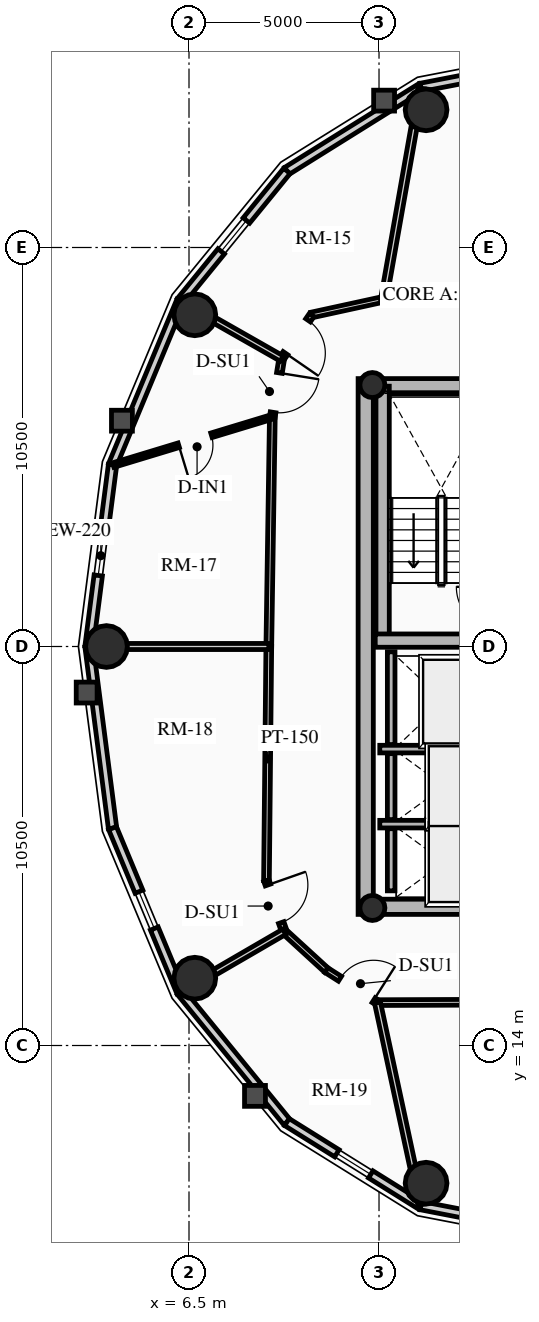
"""IFC4 building model, lengths in metres.
Left out: names, types, materials, properties, quantities, classifications, styles, units other than length and angle.
Written with IfcOpenShell. Run it as: python <this file> out.ifc"""

import sys

from ifc_helpers import new_model, si_unit, direction, frame, frame_2d, origin, origin_2d, place, context, subcontext, project, spatial, rectangle, circle, hollow_circle, extrude, source, transform, mapped, element, fill, save


model = new_model("IFC4")
c1 = context("Model", 3, precision=1e-05, world=origin(), true_north=direction((0.0, 1.0)))
c2 = subcontext(c1, "Body", "Model", "MODEL_VIEW")
j1 = project(units=[si_unit("LENGTHUNIT", "METRE"), si_unit("PLANEANGLEUNIT", "RADIAN")], contexts=[c1])
p1 = place(None, origin())
s1 = spatial("IfcSite", under=j1, at=p1, CompositionType="ELEMENT")
p2 = place(p1, origin())
s2 = spatial("IfcBuilding", under=s1, at=p2, CompositionType="ELEMENT")
p3 = place(p2, frame((0.0, 0.0, 211.21)))
s3 = spatial("IfcBuildingStorey", under=s2, at=p3, CompositionType="ELEMENT", Elevation=211.21)
p4 = place(p3, frame((11.15, 17.45, 0.0), z_axis=(0.0, 0.0, 1.0), x_axis=(0.0, 1.0, 0.0)))
e1 = element("IfcWall", 1, at=p4, inside=s3, PredefinedType="SHEAR", context=c2, shape_type="SweptSolid", body=[
    extrude(rectangle(XDim=14.1, YDim=0.4, at=frame_2d((7.05, 0.0))), origin(), (0.0, 0.0, 1.0), 2.91),
])
p5 = place(p3, frame((11.15, 17.65, 0.0), z_axis=(0.0, 0.0, 1.0), x_axis=(1.0, 0.0, 0.0)))
e2 = element("IfcWall", 2, at=p5, inside=s3, PredefinedType="SHEAR", context=c2, shape_type="SweptSolid", body=[
    extrude(rectangle(XDim=10.7, YDim=0.4, at=frame_2d((5.35, 0.0))), origin(), (0.0, 0.0, 1.0), 2.91),
])
m1 = source(origin(), c2, "Body", "SweptSolid", [
    extrude(rectangle(XDim=1.5, YDim=2.02, at=frame_2d((0.75, 1.01))), frame((0.0, 0.21, 0.0), z_axis=(0.0, -1.0, 0.0), x_axis=(1.0, 0.0, 0.0)), (0.0, 0.0, 1.0), 0.42),
])
p6 = place(p5, frame((5.45, 0.0, 0.0)))
e3 = element("IfcOpeningElement", 3, at=p6, cuts=e2, PredefinedType="OPENING", context=c2, shape_type="MappedRepresentation", body=[
    mapped(m1, transform((0.0, 0.0, 0.0), x_axis=(1.0, 0.0, 0.0), y_axis=(0.0, 1.0, 0.0), z_axis=(0.0, 0.0, 1.0), scale=1.0)),
])
p7 = place(p3, frame((11.15, 31.35, 0.0), z_axis=(0.0, 0.0, 1.0), x_axis=(1.0, 0.0, 0.0)))
e4 = element("IfcWall", 4, at=p7, inside=s3, PredefinedType="SHEAR", context=c2, shape_type="SweptSolid", body=[
    extrude(rectangle(XDim=10.7, YDim=0.4, at=frame_2d((5.35, 0.0))), origin(), (0.0, 0.0, 1.0), 2.91),
])
p8 = place(p7, frame((4.6, 0.0, 0.0)))
e5 = element("IfcOpeningElement", 5, at=p8, cuts=e4, PredefinedType="OPENING", context=c2, shape_type="MappedRepresentation", body=[
    mapped(m1, transform((0.0, 0.0, 0.0), x_axis=(1.0, 0.0, 0.0), y_axis=(0.0, 1.0, 0.0), z_axis=(0.0, 0.0, 1.0), scale=1.0)),
])
p9 = place(p3, frame((11.595, 24.655, 0.0), z_axis=(0.0, 0.0, 1.0), x_axis=(0.0, 1.0, 0.0)))
e6 = element("IfcWall", 6, at=p9, inside=s3, PredefinedType="SHEAR", context=c2, shape_type="SweptSolid", body=[
    extrude(rectangle(XDim=6.695, YDim=0.35, at=frame_2d((3.348, 0.0))), origin(), (0.0, 0.0, 1.0), 2.91),
])
p10 = place(p3, frame((11.4, 24.655, 0.0), z_axis=(0.0, 0.0, 1.0), x_axis=(1.0, 0.0, 0.0)))
e7 = element("IfcWall", 7, at=p10, inside=s3, PredefinedType="SHEAR", context=c2, shape_type="SweptSolid", body=[
    extrude(rectangle(XDim=3.285, YDim=0.35, at=frame_2d((1.643, 0.0))), origin(), (0.0, 0.0, 1.0), 2.91),
])
for number, where, z_axis, x_axis in (
    (8, (11.325, 17.62, 0.0), (0.0, 0.0, 1.0), (1.0, 0.0, 0.0)),
    (9, (11.325, 31.38, 0.0), (0.0, 0.0, 1.0), (1.0, 0.0, 0.0)),
):
    element("IfcColumn", number, at=place(p3, frame(where, z_axis=z_axis, x_axis=x_axis)), inside=s3, PredefinedType="COLUMN", context=c2, shape_type="SweptSolid", body=[
        extrude(hollow_circle(Radius=0.33, WallThickness=0.025, at=origin_2d()), origin(), (0.0, 0.0, 1.0), 2.91),
    ])
for number, where, z_axis, x_axis in (
    (10, (12.739, 38.623, 0.0), (0.0, 0.0, 1.0), (1.0, 0.0, 0.0)),
    (11, (6.653, 33.229, 0.0), (0.0, 0.0, 1.0), (1.0, 0.0, 0.0)),
    (12, (4.328, 24.5, 0.0), (0.0, 0.0, 1.0), (1.0, 0.0, 0.0)),
    (13, (6.653, 15.771, 0.0), (0.0, 0.0, 1.0), (1.0, 0.0, 0.0)),
    (14, (12.739, 10.377, 0.0), (0.0, 0.0, 1.0), (1.0, 0.0, 0.0)),
):
    element("IfcColumn", number, at=place(p3, frame(where, z_axis=z_axis, x_axis=x_axis)), inside=s3, PredefinedType="USERDEFINED", context=c2, shape_type="SweptSolid", body=[
        extrude(circle(Radius=0.55, at=origin_2d()), origin(), (0.0, 0.0, 1.0), 2.91),
    ])
p11 = place(p3, frame((12.597, 39.213, 0.0), z_axis=(0.0, 0.0, 1.0), x_axis=(0.981700307484, 0.190432419211, 0.0)))
e15 = element("IfcWall", 15, at=p11, inside=s3, PredefinedType="SOLIDWALL", context=c2, shape_type="SweptSolid", body=[
    extrude(rectangle(XDim=3.976, YDim=0.22, at=frame_2d((1.988, 0.0))), origin(), (0.0, 0.0, 1.0), 2.322),
])
m2 = source(origin(), c2, "Body", "SweptSolid", [
    extrude(rectangle(XDim=1.05, YDim=1.3, at=frame_2d((0.525, 0.65))), frame((0.0, 0.12, 0.0), z_axis=(0.0, -1.0, 0.0), x_axis=(1.0, 0.0, 0.0)), (0.0, 0.0, 1.0), 0.24),
])
p12 = place(p11, frame((1.463, 0.0, 0.65)))
e16 = element("IfcOpeningElement", 16, at=p12, cuts=e15, PredefinedType="OPENING", context=c2, shape_type="MappedRepresentation", body=[
    mapped(m2, transform((0.0, 0.0, 0.0), x_axis=(1.0, 0.0, 0.0), y_axis=(0.0, 1.0, 0.0), z_axis=(0.0, 0.0, 1.0), scale=1.0)),
])
p13 = place(p3, frame((9.076, 37.015, 0.0), z_axis=(0.0, 0.0, 1.0), x_axis=(0.848318713376, 0.529485939886, 0.0)))
e17 = element("IfcWall", 17, at=p13, inside=s3, PredefinedType="SOLIDWALL", context=c2, shape_type="SweptSolid", body=[
    extrude(rectangle(XDim=4.15, YDim=0.22, at=frame_2d((2.075, 0.0))), origin(), (0.0, 0.0, 1.0), 2.322),
])
p14 = place(p3, frame((6.282, 33.593, 0.0), z_axis=(0.0, 0.0, 1.0), x_axis=(0.632467166636, 0.774587169483, 0.0)))
e18 = element("IfcWall", 18, at=p14, inside=s3, PredefinedType="SOLIDWALL", context=c2, shape_type="SweptSolid", body=[
    extrude(rectangle(XDim=4.418, YDim=0.22, at=frame_2d((2.209, 0.0))), origin(), (0.0, 0.0, 1.0), 2.322),
])
p15 = place(p14, frame((1.684, 0.0, 0.65)))
e19 = element("IfcOpeningElement", 19, at=p15, cuts=e18, PredefinedType="OPENING", context=c2, shape_type="MappedRepresentation", body=[
    mapped(m2, transform((0.0, 0.0, 0.0), x_axis=(1.0, 0.0, 0.0), y_axis=(0.0, 1.0, 0.0), z_axis=(0.0, 0.0, 1.0), scale=1.0)),
])
p16 = place(p3, frame((4.488, 29.281, 0.0), z_axis=(0.0, 0.0, 1.0), x_axis=(0.384036305194, 0.923317993052, 0.0)))
e20 = element("IfcWall", 20, at=p16, inside=s3, PredefinedType="SOLIDWALL", context=c2, shape_type="SweptSolid", body=[
    extrude(rectangle(XDim=4.671, YDim=0.22, at=frame_2d((2.335, 0.0))), origin(), (0.0, 0.0, 1.0), 2.322),
])
p17 = place(p3, frame((3.87, 24.5, 0.0), z_axis=(0.0, 0.0, 1.0), x_axis=(0.128241318541, 0.991742993027, 0.0)))
e21 = element("IfcWall", 21, at=p17, inside=s3, PredefinedType="SOLIDWALL", context=c2, shape_type="SweptSolid", body=[
    extrude(rectangle(XDim=4.82, YDim=0.22, at=frame_2d((2.41, 0.0))), origin(), (0.0, 0.0, 1.0), 2.322),
])
p18 = place(p17, frame((1.885, 0.0, 0.65)))
e22 = element("IfcOpeningElement", 22, at=p18, cuts=e21, PredefinedType="OPENING", context=c2, shape_type="MappedRepresentation", body=[
    mapped(m2, transform((0.0, 0.0, 0.0), x_axis=(1.0, 0.0, 0.0), y_axis=(0.0, 1.0, 0.0), z_axis=(0.0, 0.0, 1.0), scale=1.0)),
])
p19 = place(p3, frame((4.488, 19.719, 0.0), z_axis=(0.0, 0.0, 1.0), x_axis=(-0.128241318541, 0.991742993027, 0.0)))
e23 = element("IfcWall", 23, at=p19, inside=s3, PredefinedType="SOLIDWALL", context=c2, shape_type="SweptSolid", body=[
    extrude(rectangle(XDim=4.82, YDim=0.22, at=frame_2d((2.41, 0.0))), origin(), (0.0, 0.0, 1.0), 2.322),
])
p20 = place(p3, frame((6.282, 15.407, 0.0), z_axis=(0.0, 0.0, 1.0), x_axis=(-0.384036305194, 0.923317993052, 0.0)))
e24 = element("IfcWall", 24, at=p20, inside=s3, PredefinedType="SOLIDWALL", context=c2, shape_type="SweptSolid", body=[
    extrude(rectangle(XDim=4.671, YDim=0.22, at=frame_2d((2.335, 0.0))), origin(), (0.0, 0.0, 1.0), 2.322),
])
p21 = place(p20, frame((1.81, 0.0, 0.65)))
e25 = element("IfcOpeningElement", 25, at=p21, cuts=e24, PredefinedType="OPENING", context=c2, shape_type="MappedRepresentation", body=[
    mapped(m2, transform((0.0, 0.0, 0.0), x_axis=(1.0, 0.0, 0.0), y_axis=(0.0, 1.0, 0.0), z_axis=(0.0, 0.0, 1.0), scale=1.0)),
])
p22 = place(p3, frame((9.076, 11.985, 0.0), z_axis=(0.0, 0.0, 1.0), x_axis=(-0.632467166636, 0.774587169483, 0.0)))
e26 = element("IfcWall", 26, at=p22, inside=s3, PredefinedType="SOLIDWALL", context=c2, shape_type="SweptSolid", body=[
    extrude(rectangle(XDim=4.418, YDim=0.22, at=frame_2d((2.209, 0.0))), origin(), (0.0, 0.0, 1.0), 2.322),
])
p23 = place(p3, frame((12.597, 9.787, 0.0), z_axis=(0.0, 0.0, 1.0), x_axis=(-0.848318713376, 0.529485939886, 0.0)))
e27 = element("IfcWall", 27, at=p23, inside=s3, PredefinedType="SOLIDWALL", context=c2, shape_type="SweptSolid", body=[
    extrude(rectangle(XDim=4.15, YDim=0.22, at=frame_2d((2.075, 0.0))), origin(), (0.0, 0.0, 1.0), 2.322),
])
p24 = place(p23, frame((1.55, 0.0, 0.65)))
e28 = element("IfcOpeningElement", 28, at=p24, cuts=e27, PredefinedType="OPENING", context=c2, shape_type="MappedRepresentation", body=[
    mapped(m2, transform((0.0, 0.0, 0.0), x_axis=(1.0, 0.0, 0.0), y_axis=(0.0, 1.0, 0.0), z_axis=(0.0, 0.0, 1.0), scale=1.0)),
])
p25 = place(p3, frame((16.5, 9.03, 0.0), z_axis=(0.0, 0.0, 1.0), x_axis=(-0.981700307484, 0.190432419211, 0.0)))
e29 = element("IfcWall", 29, at=p25, inside=s3, PredefinedType="SOLIDWALL", context=c2, shape_type="SweptSolid", body=[
    extrude(rectangle(XDim=3.976, YDim=0.22, at=frame_2d((1.988, 0.0))), origin(), (0.0, 0.0, 1.0), 2.322),
])
p26 = place(p25, frame((1.463, 0.0, 0.65)))
e30 = element("IfcOpeningElement", 30, at=p26, cuts=e29, PredefinedType="OPENING", context=c2, shape_type="MappedRepresentation", body=[
    mapped(m2, transform((0.0, 0.0, 0.0), x_axis=(1.0, 0.0, 0.0), y_axis=(0.0, 1.0, 0.0), z_axis=(0.0, 0.0, 1.0), scale=1.0)),
])
p27 = place(p3, frame((11.52, 21.8, 0.0), z_axis=(0.0, 0.0, 1.0), x_axis=(1.0, 0.0, 0.0)))
e31 = element("IfcWall", 31, at=p27, inside=s3, PredefinedType="SHEAR", context=c2, shape_type="SweptSolid", body=[
    extrude(rectangle(XDim=2.97, YDim=0.2, at=frame_2d((1.485, 0.0))), origin(), (0.0, 0.0, 1.0), 2.91),
])
p28 = place(p3, frame((11.82, 21.92, 0.0), z_axis=(0.0, 0.0, 1.0), x_axis=(0.0, 1.0, 0.0)))
e32 = element("IfcWall", 32, at=p28, inside=s3, PredefinedType="SHEAR", context=c2, shape_type="SweptSolid", body=[
    extrude(rectangle(XDim=2.44, YDim=0.2, at=frame_2d((1.22, 0.0))), origin(), (0.0, 0.0, 1.0), 2.91),
])
p29 = place(p3, frame((11.52, 19.825, 0.0), z_axis=(0.0, 0.0, 1.0), x_axis=(1.0, 0.0, 0.0)))
e33 = element("IfcWall", 33, at=p29, inside=s3, PredefinedType="SHEAR", context=c2, shape_type="SweptSolid", body=[
    extrude(rectangle(XDim=2.97, YDim=0.2, at=frame_2d((1.485, 0.0))), origin(), (0.0, 0.0, 1.0), 2.91),
])
p30 = place(p3, frame((11.82, 19.945, 0.0), z_axis=(0.0, 0.0, 1.0), x_axis=(0.0, 1.0, 0.0)))
e34 = element("IfcWall", 34, at=p30, inside=s3, PredefinedType="SHEAR", context=c2, shape_type="SweptSolid", body=[
    extrude(rectangle(XDim=1.735, YDim=0.2, at=frame_2d((0.867, 0.0))), origin(), (0.0, 0.0, 1.0), 2.91),
])
p31 = place(p3, frame((11.82, 18.07, 0.0), z_axis=(0.0, 0.0, 1.0), x_axis=(0.0, 1.0, 0.0)))
e35 = element("IfcWall", 35, at=p31, inside=s3, PredefinedType="SHEAR", context=c2, shape_type="SweptSolid", body=[
    extrude(rectangle(XDim=1.635, YDim=0.2, at=frame_2d((0.817, 0.0))), origin(), (0.0, 0.0, 1.0), 2.91),
])
p32 = place(p3, frame((18.143, 33.86, 0.0), z_axis=(0.0, 0.0, 1.0), x_axis=(-0.999419208319, -0.034077060363, 0.0)))
e36 = element("IfcWall", 36, at=p32, inside=s3, PredefinedType="PARTITIONING", context=c2, shape_type="SweptSolid", body=[
    extrude(rectangle(XDim=6.527, YDim=0.15, at=frame_2d((3.263, 0.0))), origin(), (0.0, 0.0, 1.0), 2.255),
])
p33 = place(p3, frame((11.62, 33.637, 0.0), z_axis=(0.0, 0.0, 1.0), x_axis=(-0.97702579435, -0.213121085711, 0.0)))
e37 = element("IfcWall", 37, at=p33, inside=s3, PredefinedType="PARTITIONING", context=c2, shape_type="SweptSolid", body=[
    extrude(rectangle(XDim=1.935, YDim=0.15, at=frame_2d((0.967, 0.0))), origin(), (0.0, 0.0, 1.0), 2.255),
])
p34 = place(p3, frame((9.729, 33.225, 0.0), z_axis=(0.0, 0.0, 1.0), x_axis=(-0.567183649484, -0.82359134755, 0.0)))
e38 = element("IfcWall", 38, at=p34, inside=s3, PredefinedType="PARTITIONING", context=c2, shape_type="SweptSolid", body=[
    extrude(rectangle(XDim=1.392, YDim=0.15, at=frame_2d((0.696, 0.0))), origin(), (0.0, 0.0, 1.0), 2.322),
])
m3 = source(origin(), c2, "Body", "SweptSolid", [
    extrude(rectangle(XDim=1.05, YDim=2.015, at=frame_2d((0.525, 1.007))), frame((0.0, 0.085, 0.0), z_axis=(0.0, -1.0, 0.0), x_axis=(1.0, 0.0, 0.0)), (0.0, 0.0, 1.0), 0.17),
])
p35 = place(p34, frame((0.171, 0.0, 0.0)))
e39 = element("IfcOpeningElement", 39, at=p35, cuts=e38, PredefinedType="OPENING", context=c2, shape_type="MappedRepresentation", body=[
    mapped(m3, transform((0.0, 0.0, 0.0), x_axis=(1.0, 0.0, 0.0), y_axis=(0.0, 1.0, 0.0), z_axis=(0.0, 0.0, 1.0), scale=1.0)),
])
p36 = place(p3, frame((8.94, 32.078, 0.0), z_axis=(0.0, 0.0, 1.0), x_axis=(-0.159148467753, -0.98725466077, 0.0)))
e40 = element("IfcWall", 40, at=p36, inside=s3, PredefinedType="PARTITIONING", context=c2, shape_type="SweptSolid", body=[
    extrude(rectangle(XDim=1.554, YDim=0.15, at=frame_2d((0.777, 0.0))), origin(), (0.0, 0.0, 1.0), 2.255),
])
p37 = place(p36, frame((0.384, 0.0, 0.0)))
e41 = element("IfcOpeningElement", 41, at=p37, cuts=e40, PredefinedType="OPENING", context=c2, shape_type="MappedRepresentation", body=[
    mapped(m3, transform((0.0, 0.0, 0.0), x_axis=(1.0, 0.0, 0.0), y_axis=(0.0, 1.0, 0.0), z_axis=(0.0, 0.0, 1.0), scale=1.0)),
])
p38 = place(p3, frame((8.693, 30.544, 0.0), z_axis=(0.0, 0.0, 1.0), x_axis=(-0.015307007986, -0.99988284089, 0.0)))
e42 = element("IfcWall", 42, at=p38, inside=s3, PredefinedType="PARTITIONING", context=c2, shape_type="SweptSolid", body=[
    extrude(rectangle(XDim=6.045, YDim=0.15, at=frame_2d((3.022, 0.0))), origin(), (0.0, 0.0, 1.0), 2.255),
])
p39 = place(p3, frame((8.6, 24.5, 0.0), z_axis=(0.0, 0.0, 1.0), x_axis=(-0.010023665349, -0.999949761805, 0.0)))
e43 = element("IfcWall", 43, at=p39, inside=s3, PredefinedType="PARTITIONING", context=c2, shape_type="SweptSolid", body=[
    extrude(rectangle(XDim=6.162, YDim=0.15, at=frame_2d((3.081, 0.0))), origin(), (0.0, 0.0, 1.0), 2.255),
])
p40 = place(p3, frame((8.538, 18.338, 0.0), z_axis=(0.0, 0.0, 1.0), x_axis=(0.331358150167, -0.94350504838, 0.0)))
e44 = element("IfcWall", 44, at=p40, inside=s3, PredefinedType="PARTITIONING", context=c2, shape_type="SweptSolid", body=[
    extrude(rectangle(XDim=1.424, YDim=0.15, at=frame_2d((0.712, 0.0))), origin(), (0.0, 0.0, 1.0), 2.255),
])
p41 = place(p40, frame((0.12, 0.0, 0.0)))
e45 = element("IfcOpeningElement", 45, at=p41, cuts=e44, PredefinedType="OPENING", context=c2, shape_type="MappedRepresentation", body=[
    mapped(m3, transform((0.0, 0.0, 0.0), x_axis=(1.0, 0.0, 0.0), y_axis=(0.0, 1.0, 0.0), z_axis=(0.0, 0.0, 1.0), scale=1.0)),
])
p42 = place(p3, frame((9.01, 16.994, 0.0), z_axis=(0.0, 0.0, 1.0), x_axis=(0.737701798986, -0.67512669609, 0.0)))
e46 = element("IfcWall", 46, at=p42, inside=s3, PredefinedType="PARTITIONING", context=c2, shape_type="SweptSolid", body=[
    extrude(rectangle(XDim=1.498, YDim=0.15, at=frame_2d((0.749, 0.0))), origin(), (0.0, 0.0, 1.0), 2.322),
])
p43 = place(p3, frame((10.115, 15.983, 0.0), z_axis=(0.0, 0.0, 1.0), x_axis=(0.843995849351, -0.536349705209, 0.0)))
e47 = element("IfcWall", 47, at=p43, inside=s3, PredefinedType="PARTITIONING", context=c2, shape_type="SweptSolid", body=[
    extrude(rectangle(XDim=1.593, YDim=0.15, at=frame_2d((0.796, 0.0))), origin(), (0.0, 0.0, 1.0), 2.255),
])
p44 = place(p43, frame((0.423, 0.0, 0.0)))
e48 = element("IfcOpeningElement", 48, at=p44, cuts=e47, PredefinedType="OPENING", context=c2, shape_type="MappedRepresentation", body=[
    mapped(m3, transform((0.0, 0.0, 0.0), x_axis=(1.0, 0.0, 0.0), y_axis=(0.0, 1.0, 0.0), z_axis=(0.0, 0.0, 1.0), scale=1.0)),
])
p45 = place(p3, frame((11.46, 15.129, 0.0), z_axis=(0.0, 0.0, 1.0), x_axis=(0.999993513287, 0.003601858435, 0.0)))
e49 = element("IfcWall", 49, at=p45, inside=s3, PredefinedType="PARTITIONING", context=c2, shape_type="SweptSolid", body=[
    extrude(rectangle(XDim=3.321, YDim=0.15, at=frame_2d((1.661, 0.0))), origin(), (0.0, 0.0, 1.0), 2.322),
])
p46 = place(p3, frame((11.62, 33.637, 0.0), z_axis=(0.0, 0.0, 1.0), x_axis=(0.174269061361, 0.984698072636, 0.0)))
e50 = element("IfcWall", 50, at=p46, inside=s3, PredefinedType="PARTITIONING", context=c2, shape_type="SweptSolid", body=[
    extrude(rectangle(XDim=5.643, YDim=0.16, at=frame_2d((2.822, 0.0))), origin(), (0.0, 0.0, 1.0), 2.322),
])
p47 = place(p3, frame((8.94, 32.078, 0.0), z_axis=(0.0, 0.0, 1.0), x_axis=(-0.869170975588, 0.494511693689, 0.0)))
e51 = element("IfcWall", 51, at=p47, inside=s3, PredefinedType="PARTITIONING", context=c2, shape_type="SweptSolid", body=[
    extrude(rectangle(XDim=3.039, YDim=0.16, at=frame_2d((1.52, 0.0))), origin(), (0.0, 0.0, 1.0), 2.322),
])
p48 = place(p3, frame((8.6, 24.5, 0.0), z_axis=(0.0, 0.0, 1.0), x_axis=(-1.0, 0.0, 0.0)))
e52 = element("IfcWall", 52, at=p48, inside=s3, PredefinedType="PARTITIONING", context=c2, shape_type="SweptSolid", body=[
    extrude(rectangle(XDim=4.71, YDim=0.16, at=frame_2d((2.355, 0.0))), origin(), (0.0, 0.0, 1.0), 2.322),
])
p49 = place(p3, frame((9.01, 16.994, 0.0), z_axis=(0.0, 0.0, 1.0), x_axis=(-0.864647164532, -0.502379618283, 0.0)))
e53 = element("IfcWall", 53, at=p49, inside=s3, PredefinedType="PARTITIONING", context=c2, shape_type="SweptSolid", body=[
    extrude(rectangle(XDim=3.136, YDim=0.16, at=frame_2d((1.568, 0.0))), origin(), (0.0, 0.0, 1.0), 2.322),
])
p50 = place(p3, frame((11.46, 15.129, 0.0), z_axis=(0.0, 0.0, 1.0), x_axis=(0.210058897642, -0.977688733453, 0.0)))
e54 = element("IfcWall", 54, at=p50, inside=s3, PredefinedType="PARTITIONING", context=c2, shape_type="SweptSolid", body=[
    extrude(rectangle(XDim=5.444, YDim=0.16, at=frame_2d((2.722, 0.0))), origin(), (0.0, 0.0, 1.0), 2.322),
])
p51 = place(p3, frame((8.693, 30.544, 0.0), z_axis=(0.0, 0.0, 1.0), x_axis=(-0.956933754187, -0.290306372814, 0.0)))
e55 = element("IfcWall", 55, at=p51, inside=s3, PredefinedType="PARTITIONING", context=c2, shape_type="SweptSolid", body=[
    extrude(rectangle(XDim=4.374, YDim=0.125, at=frame_2d((2.187, 0.0))), origin(), (0.0, 0.0, 1.0), 2.255),
])
m4 = source(origin(), c2, "Body", "SweptSolid", [
    extrude(rectangle(XDim=0.9, YDim=2.005, at=frame_2d((0.45, 1.002))), frame((0.0, 0.073, 0.0), z_axis=(0.0, -1.0, 0.0), x_axis=(1.0, 0.0, 0.0)), (0.0, 0.0, 1.0), 0.145),
])
p52 = place(p51, frame((1.674, 0.0, 0.0)))
e56 = element("IfcOpeningElement", 56, at=p52, cuts=e55, PredefinedType="OPENING", context=c2, shape_type="MappedRepresentation", body=[
    mapped(m4, transform((0.0, 0.0, 0.0), x_axis=(1.0, 0.0, 0.0), y_axis=(0.0, 1.0, 0.0), z_axis=(0.0, 0.0, 1.0), scale=1.0)),
])
m5 = source(origin(), c2, "Body", "SweptSolid", [
    extrude(rectangle(XDim=1.05, YDim=1.3, at=frame_2d((0.525, 0.65))), frame((0.0, 0.03, 0.0), z_axis=(0.0, -1.0, 0.0), x_axis=(1.0, 0.0, 0.0)), (0.0, 0.0, 1.0), 0.06),
])
p53 = place(p15, origin())
e57 = element("IfcWindow", 57, at=p53, inside=s3, PartitioningType="SINGLE_PANEL", PredefinedType="WINDOW", context=c2, shape_type="MappedRepresentation", body=[
    mapped(m5, transform((0.0, 0.0, 0.0), x_axis=(1.0, 0.0, 0.0), y_axis=(0.0, 1.0, 0.0), z_axis=(0.0, 0.0, 1.0), scale=1.0)),
])
fill(e19, e57)
p54 = place(p18, origin())
e58 = element("IfcWindow", 58, at=p54, inside=s3, PartitioningType="SINGLE_PANEL", PredefinedType="WINDOW", context=c2, shape_type="MappedRepresentation", body=[
    mapped(m5, transform((0.0, 0.0, 0.0), x_axis=(1.0, 0.0, 0.0), y_axis=(0.0, 1.0, 0.0), z_axis=(0.0, 0.0, 1.0), scale=1.0)),
])
fill(e22, e58)
p55 = place(p21, origin())
e59 = element("IfcWindow", 59, at=p55, inside=s3, PartitioningType="SINGLE_PANEL", PredefinedType="WINDOW", context=c2, shape_type="MappedRepresentation", body=[
    mapped(m5, transform((0.0, 0.0, 0.0), x_axis=(1.0, 0.0, 0.0), y_axis=(0.0, 1.0, 0.0), z_axis=(0.0, 0.0, 1.0), scale=1.0)),
])
fill(e25, e59)
p56 = place(p24, origin())
e60 = element("IfcWindow", 60, at=p56, inside=s3, PartitioningType="SINGLE_PANEL", PredefinedType="WINDOW", context=c2, shape_type="MappedRepresentation", body=[
    mapped(m5, transform((0.0, 0.0, 0.0), x_axis=(1.0, 0.0, 0.0), y_axis=(0.0, 1.0, 0.0), z_axis=(0.0, 0.0, 1.0), scale=1.0)),
])
fill(e28, e60)
m6 = source(origin(), c2, "Body", "SweptSolid", [
    extrude(rectangle(XDim=1.05, YDim=2.015, at=frame_2d((0.525, 1.007))), frame((0.0, 0.025, 0.0), z_axis=(0.0, -1.0, 0.0), x_axis=(1.0, 0.0, 0.0)), (0.0, 0.0, 1.0), 0.05),
])
p57 = place(p35, origin())
e61 = element("IfcDoor", 61, at=p57, inside=s3, OperationType="SINGLE_SWING_RIGHT", PredefinedType="DOOR", context=c2, shape_type="MappedRepresentation", body=[
    mapped(m6, transform((0.0, 0.0, 0.0), x_axis=(1.0, 0.0, 0.0), y_axis=(0.0, 1.0, 0.0), z_axis=(0.0, 0.0, 1.0), scale=1.0)),
])
fill(e39, e61)
p58 = place(p37, origin())
e62 = element("IfcDoor", 62, at=p58, inside=s3, OperationType="SINGLE_SWING_LEFT", PredefinedType="DOOR", context=c2, shape_type="MappedRepresentation", body=[
    mapped(m6, transform((0.0, 0.0, 0.0), x_axis=(1.0, 0.0, 0.0), y_axis=(0.0, 1.0, 0.0), z_axis=(0.0, 0.0, 1.0), scale=1.0)),
])
fill(e41, e62)
m7 = source(origin(), c2, "Body", "SweptSolid", [
    extrude(rectangle(XDim=0.9, YDim=2.005, at=frame_2d((0.45, 1.002))), frame((0.0, 0.025, 0.0), z_axis=(0.0, -1.0, 0.0), x_axis=(1.0, 0.0, 0.0)), (0.0, 0.0, 1.0), 0.05),
])
p59 = place(p52, origin())
e63 = element("IfcDoor", 63, at=p59, inside=s3, OperationType="SINGLE_SWING_RIGHT", PredefinedType="DOOR", context=c2, shape_type="MappedRepresentation", body=[
    mapped(m7, transform((0.0, 0.0, 0.0), x_axis=(1.0, 0.0, 0.0), y_axis=(0.0, 1.0, 0.0), z_axis=(0.0, 0.0, 1.0), scale=1.0)),
])
fill(e56, e63)
p60 = place(p41, origin())
e64 = element("IfcDoor", 64, at=p60, inside=s3, OperationType="SINGLE_SWING_LEFT", PredefinedType="DOOR", context=c2, shape_type="MappedRepresentation", body=[
    mapped(m6, transform((0.0, 0.0, 0.0), x_axis=(1.0, 0.0, 0.0), y_axis=(0.0, 1.0, 0.0), z_axis=(0.0, 0.0, 1.0), scale=1.0)),
])
fill(e45, e64)
p61 = place(p44, origin())
e65 = element("IfcDoor", 65, at=p61, inside=s3, OperationType="SINGLE_SWING_RIGHT", PredefinedType="DOOR", context=c2, shape_type="MappedRepresentation", body=[
    mapped(m6, transform((0.0, 0.0, 0.0), x_axis=(1.0, 0.0, 0.0), y_axis=(0.0, 1.0, 0.0), z_axis=(0.0, 0.0, 1.0), scale=1.0)),
])
fill(e48, e65)
save(model, sys.argv[1])
